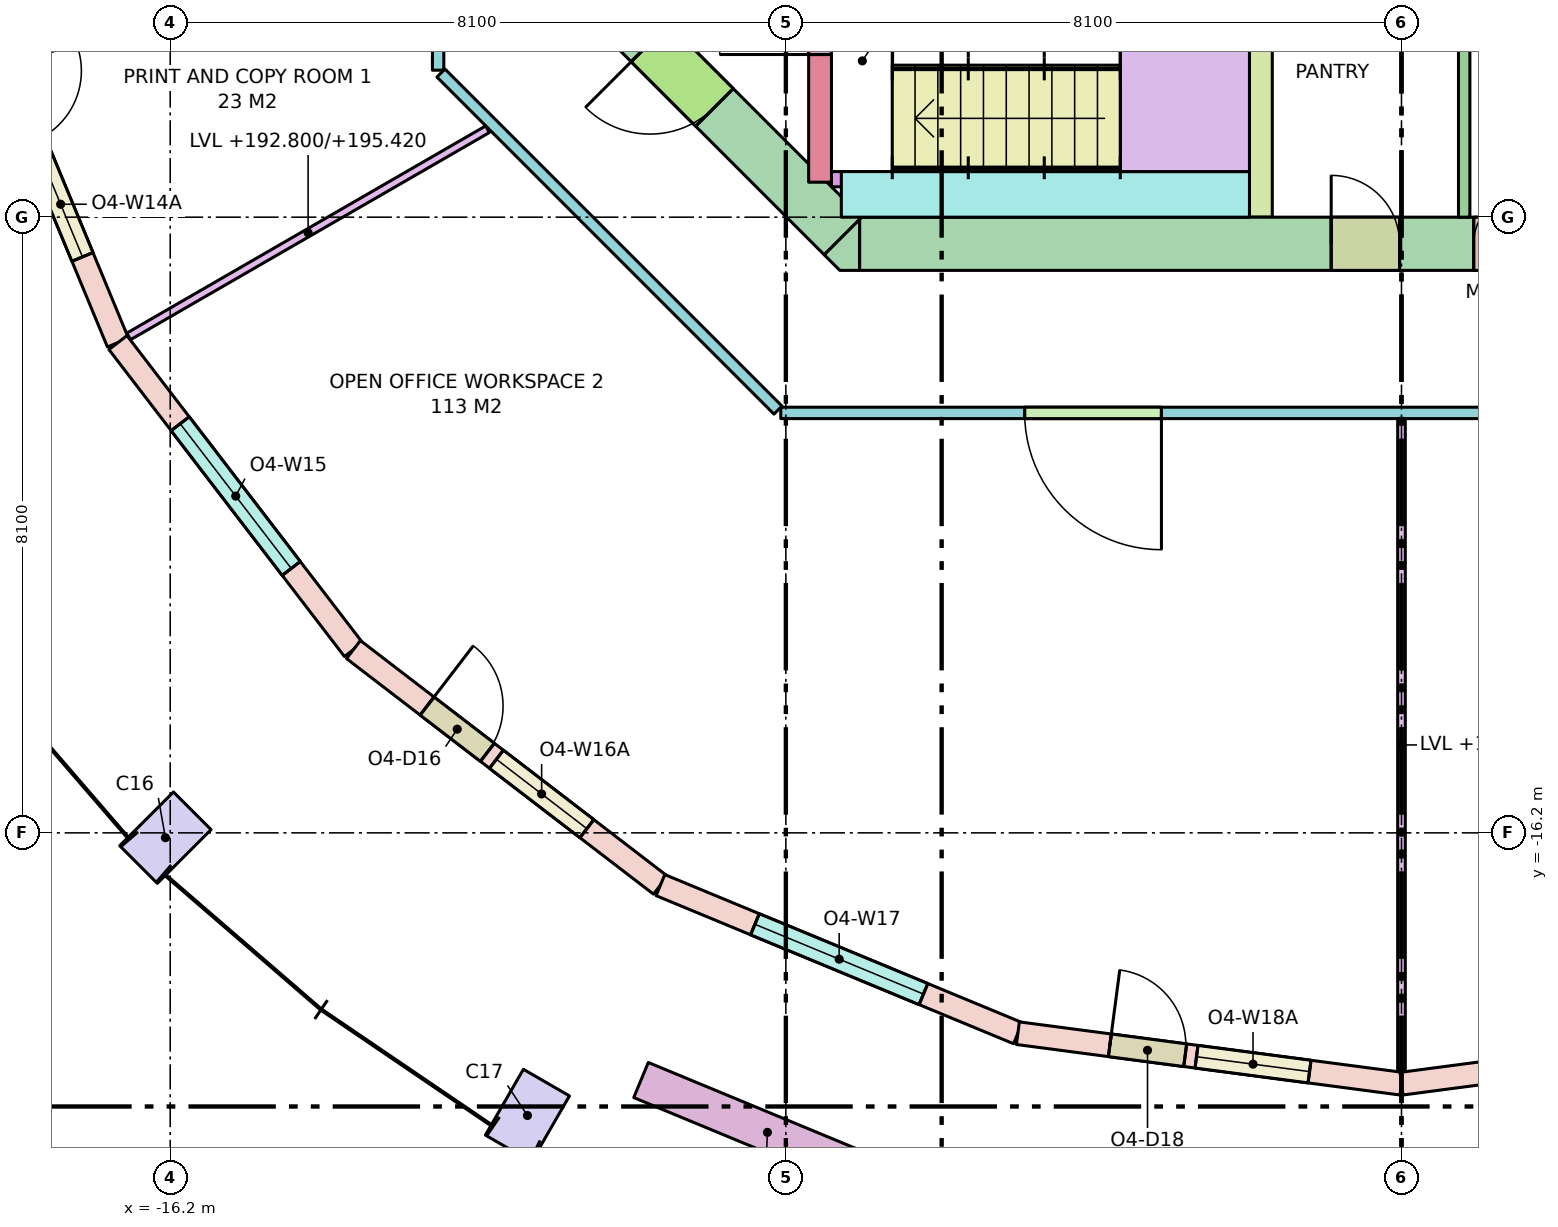
"""IFC4 building model, lengths in metres.
Left out: names, types, materials, properties, quantities, classifications, styles, units other than length and angle.
Written with IfcOpenShell. Run it as: python <this file> out.ifc"""

import sys

from ifc_helpers import new_model, si_unit, direction, frame, frame_2d, origin, origin_2d, place, context, subcontext, project, spatial, polyline, rectangle, outline, extrude, element, fill, save


model = new_model("IFC4")
c1 = context("Model", 3, precision=1e-05, world=origin(), true_north=direction((0.0, 1.0)))
c2 = subcontext(c1, "Body", "Model", "MODEL_VIEW")
j1 = project(units=[si_unit("LENGTHUNIT", "METRE"), si_unit("PLANEANGLEUNIT", "RADIAN")], contexts=[c1])
p1 = place(None, origin())
s1 = spatial("IfcSite", under=j1, at=p1, CompositionType="ELEMENT")
p2 = place(p1, origin())
s2 = spatial("IfcBuilding", under=s1, at=p2, CompositionType="ELEMENT")
p3 = place(p2, frame((0.0, 0.0, 192.8)))
s3 = spatial("IfcBuildingStorey", under=s2, at=p3, CompositionType="ELEMENT", Elevation=192.8)
for number, where, z_axis, x_axis in (
    (1, (-16.263, -16.263, 0.0), (0.0, 0.0, 1.0), (0.707, -0.707, 0.0)),
    (2, (-11.5, -19.919, 0.0), (0.0, 0.0, 1.0), (0.866, -0.5, 0.0)),
):
    element("IfcColumn", number, at=place(p3, frame(where, z_axis=z_axis, x_axis=x_axis)), inside=s3, PredefinedType="COLUMN", context=c2, shape_type="SweptSolid", body=[
        extrude(rectangle(XDim=0.7, YDim=1.0, at=origin_2d()), origin(), (0.0, 0.0, 1.0), 3.7),
    ])
p4 = place(p3, frame((-7.13, -8.45, -0.28), z_axis=(0.0, 0.0, 1.0), x_axis=(1.0, 0.0, 0.0)))
e3 = element("IfcWall", 3, at=p4, inside=s3, PredefinedType="SHEAR", context=c2, shape_type="SweptSolid", body=[
    extrude(rectangle(XDim=14.26, YDim=0.7, at=frame_2d((7.13, 0.0))), origin(), (0.0, 0.0, 1.0), 3.7),
])
p5 = place(p4, frame((8.08, 0.0, 0.28)))
e4 = element("IfcOpeningElement", 4, at=p5, cuts=e3, PredefinedType="OPENING", context=c2, shape_type="SweptSolid", body=[
    extrude(rectangle(XDim=0.7, YDim=2.1, at=frame_2d((0.35, 1.05))), frame((0.0, 0.36, 0.0), z_axis=(0.0, -1.0, 0.0), x_axis=(1.0, 0.0, 0.0)), (0.0, 0.0, 1.0), 0.72),
])
p6 = place(p4, frame((6.205, 0.0, 0.28)))
e5 = element("IfcOpeningElement", 5, at=p6, cuts=e3, PredefinedType="OPENING", context=c2, shape_type="SweptSolid", body=[
    extrude(rectangle(XDim=0.9, YDim=2.1, at=frame_2d((0.45, 1.05))), frame((0.0, 0.36, 0.0), z_axis=(0.0, -1.0, 0.0), x_axis=(1.0, 0.0, 0.0)), (0.0, 0.0, 1.0), 0.72),
])
p7 = place(p4, frame((9.445, 0.0, 0.28)))
e6 = element("IfcOpeningElement", 6, at=p7, cuts=e3, PredefinedType="OPENING", context=c2, shape_type="SweptSolid", body=[
    extrude(rectangle(XDim=0.9, YDim=2.1, at=frame_2d((0.45, 1.05))), frame((0.0, 0.36, 0.0), z_axis=(0.0, -1.0, 0.0), x_axis=(1.0, 0.0, 0.0)), (0.0, 0.0, 1.0), 0.72),
])
p8 = place(p4, frame((11.431, 0.0, 0.28)))
e7 = element("IfcOpeningElement", 7, at=p8, cuts=e3, PredefinedType="OPENING", context=c2, shape_type="SweptSolid", body=[
    extrude(rectangle(XDim=0.9, YDim=2.1, at=frame_2d((0.45, 1.05))), frame((0.0, 0.36, 0.0), z_axis=(0.0, -1.0, 0.0), x_axis=(1.0, 0.0, 0.0)), (0.0, 0.0, 1.0), 0.72),
])
p9 = place(p3, frame((-7.347, -8.347, -0.28), z_axis=(0.0, 0.0, 1.0), x_axis=(-0.707106781187, 0.707106781187, 0.0)))
e8 = element("IfcWall", 8, at=p9, inside=s3, PredefinedType="SHEAR", context=c2, shape_type="SweptSolid", body=[
    extrude(rectangle(XDim=4.243, YDim=0.7, at=frame_2d((2.121, 0.0))), origin(), (0.0, 0.0, 1.0), 3.7),
])
p10 = place(p9, frame((2.393, 0.0, 0.28)))
e9 = element("IfcOpeningElement", 9, at=p10, cuts=e8, PredefinedType="OPENING", context=c2, shape_type="SweptSolid", body=[
    extrude(rectangle(XDim=1.2, YDim=2.1, at=frame_2d((0.6, 1.05))), frame((0.0, 0.36, 0.0), z_axis=(0.0, -1.0, 0.0), x_axis=(1.0, 0.0, 0.0)), (0.0, 0.0, 1.0), 0.72),
])
p11 = place(p3, frame((0.0, 0.0, -0.28)))
e10 = element("IfcWall", 10, at=p11, inside=s3, PredefinedType="SHEAR", context=c2, shape_type="SweptSolid", body=[
    extrude(outline(polyline([(-7.39, -8.8), (-7.595, -8.595), (-7.595, -8.595), (-7.595, -8.595), (-7.13, -8.13), (-7.13, -8.8), (-7.13, -8.8), (-7.39, -8.8)])), origin(), (0.0, 0.0, 1.0), 3.7),
])
p12 = place(p3, frame((-1.85, -8.1, 0.0), z_axis=(0.0, 0.0, 1.0), x_axis=(0.0, 1.0, 0.0)))
e11 = element("IfcWall", 11, at=p12, inside=s3, PredefinedType="SHEAR", context=c2, shape_type="SweptSolid", body=[
    extrude(rectangle(XDim=6.6, YDim=0.3, at=frame_2d((3.3, 0.0))), origin(), (0.0, 0.0, 1.0), 3.42),
])
p13 = place(p3, frame((-7.65, -7.64, 0.0), z_axis=(0.0, 0.0, 1.0), x_axis=(0.0, 1.0, 0.0)))
e12 = element("IfcWall", 12, at=p13, inside=s3, PredefinedType="SHEAR", context=c2, shape_type="SweptSolid", body=[
    extrude(rectangle(XDim=3.14, YDim=0.3, at=frame_2d((1.57, 0.0))), origin(), (0.0, 0.0, 1.0), 3.42),
])
p14 = place(p13, frame((1.68, 0.0, 0.0)))
e13 = element("IfcOpeningElement", 13, at=p14, cuts=e12, PredefinedType="OPENING", context=c2, shape_type="SweptSolid", body=[
    extrude(rectangle(XDim=1.32, YDim=2.1, at=frame_2d((0.66, 1.05))), frame((0.0, 0.16, 0.0), z_axis=(0.0, -1.0, 0.0), x_axis=(1.0, 0.0, 0.0)), (0.0, 0.0, 1.0), 0.32),
])
p15 = place(p3, frame((-7.5, -7.6, 0.0), z_axis=(0.0, 0.0, 1.0), x_axis=(1.0, 0.0, 0.0)))
e14 = element("IfcWall", 14, at=p15, inside=s3, PredefinedType="SHEAR", context=c2, shape_type="SweptSolid", body=[
    extrude(rectangle(XDim=0.6, YDim=0.2, at=frame_2d((0.3, 0.0))), origin(), (0.0, 0.0, 1.0), 3.42),
])
p16 = place(p3, frame((-7.37, -7.8, 0.0), z_axis=(0.0, 0.0, 1.0), x_axis=(1.0, 0.0, 0.0)))
e15 = element("IfcWall", 15, at=p16, inside=s3, PredefinedType="SHEAR", context=c2, shape_type="SweptSolid", body=[
    extrude(rectangle(XDim=5.37, YDim=0.6, at=frame_2d((2.685, 0.0))), origin(), (0.0, 0.0, 1.0), 3.42),
])
p17 = place(p3, frame((-18.836, -5.047, 0.0), z_axis=(0.0, 0.0, 1.0), x_axis=(0.382724538613, -0.923862504675, 0.0)))
e16 = element("IfcWall", 16, at=p17, inside=s3, PredefinedType="STANDARD", context=c2, shape_type="SweptSolid", body=[
    extrude(rectangle(XDim=5.091, YDim=0.3, at=frame_2d((2.545, 0.0))), origin(), (0.0, 0.0, 1.0), 3.42),
])
p18 = place(p17, frame((1.22, 0.0, 0.0)))
e17 = element("IfcOpeningElement", 17, at=p18, cuts=e16, PredefinedType="OPENING", context=c2, shape_type="SweptSolid", body=[
    extrude(rectangle(XDim=1.0, YDim=2.4, at=frame_2d((0.5, 1.2))), frame((0.0, 0.16, 0.0), z_axis=(0.0, -1.0, 0.0), x_axis=(1.0, 0.0, 0.0)), (0.0, 0.0, 1.0), 0.32),
])
p19 = place(p17, frame((2.37, 0.0, 0.8)))
e18 = element("IfcOpeningElement", 18, at=p19, cuts=e16, PredefinedType="OPENING", context=c2, shape_type="SweptSolid", body=[
    extrude(rectangle(XDim=1.5, YDim=2.4, at=frame_2d((0.75, 1.2))), frame((0.0, 0.16, 0.0), z_axis=(0.0, -1.0, 0.0), x_axis=(1.0, 0.0, 0.0)), (0.0, 0.0, 1.0), 0.32),
])
p20 = place(p3, frame((-16.887, -9.75, 0.0), z_axis=(0.0, 0.0, 1.0), x_axis=(0.608757714995, -0.79335619014, 0.0)))
e19 = element("IfcWall", 19, at=p20, inside=s3, PredefinedType="STANDARD", context=c2, shape_type="SweptSolid", body=[
    extrude(rectangle(XDim=5.091, YDim=0.3, at=frame_2d((2.545, 0.0))), origin(), (0.0, 0.0, 1.0), 3.42),
])
p21 = place(p20, frame((1.345, 0.0, 0.8)))
e20 = element("IfcOpeningElement", 20, at=p21, cuts=e19, PredefinedType="OPENING", context=c2, shape_type="SweptSolid", body=[
    extrude(rectangle(XDim=2.4, YDim=2.4, at=frame_2d((1.2, 1.2))), frame((0.0, 0.16, 0.0), z_axis=(0.0, -1.0, 0.0), x_axis=(1.0, 0.0, 0.0)), (0.0, 0.0, 1.0), 0.32),
])
p22 = place(p3, frame((-13.789, -13.789, 0.0), z_axis=(0.0, 0.0, 1.0), x_axis=(0.79335619014, -0.608757714995, 0.0)))
e21 = element("IfcWall", 21, at=p22, inside=s3, PredefinedType="STANDARD", context=c2, shape_type="SweptSolid", body=[
    extrude(rectangle(XDim=5.091, YDim=0.3, at=frame_2d((2.545, 0.0))), origin(), (0.0, 0.0, 1.0), 3.42),
])
p23 = place(p22, frame((1.22, 0.0, 0.0)))
e22 = element("IfcOpeningElement", 22, at=p23, cuts=e21, PredefinedType="OPENING", context=c2, shape_type="SweptSolid", body=[
    extrude(rectangle(XDim=1.0, YDim=2.4, at=frame_2d((0.5, 1.2))), frame((0.0, 0.16, 0.0), z_axis=(0.0, -1.0, 0.0), x_axis=(1.0, 0.0, 0.0)), (0.0, 0.0, 1.0), 0.32),
])
p24 = place(p22, frame((2.37, 0.0, 0.8)))
e23 = element("IfcOpeningElement", 23, at=p24, cuts=e21, PredefinedType="OPENING", context=c2, shape_type="SweptSolid", body=[
    extrude(rectangle(XDim=1.5, YDim=2.4, at=frame_2d((0.75, 1.2))), frame((0.0, 0.16, 0.0), z_axis=(0.0, -1.0, 0.0), x_axis=(1.0, 0.0, 0.0)), (0.0, 0.0, 1.0), 0.32),
])
p25 = place(p3, frame((-9.75, -16.887, 0.0), z_axis=(0.0, 0.0, 1.0), x_axis=(0.923862504675, -0.382724538613, 0.0)))
e24 = element("IfcWall", 24, at=p25, inside=s3, PredefinedType="STANDARD", context=c2, shape_type="SweptSolid", body=[
    extrude(rectangle(XDim=5.091, YDim=0.3, at=frame_2d((2.545, 0.0))), origin(), (0.0, 0.0, 1.0), 3.42),
])
p26 = place(p25, frame((1.345, 0.0, 0.8)))
e25 = element("IfcOpeningElement", 25, at=p26, cuts=e24, PredefinedType="OPENING", context=c2, shape_type="SweptSolid", body=[
    extrude(rectangle(XDim=2.4, YDim=2.4, at=frame_2d((1.2, 1.2))), frame((0.0, 0.16, 0.0), z_axis=(0.0, -1.0, 0.0), x_axis=(1.0, 0.0, 0.0)), (0.0, 0.0, 1.0), 0.32),
])
p27 = place(p3, frame((-5.047, -18.836, 0.0), z_axis=(0.0, 0.0, 1.0), x_axis=(0.99144890792, -0.130495451964, 0.0)))
e26 = element("IfcWall", 26, at=p27, inside=s3, PredefinedType="STANDARD", context=c2, shape_type="SweptSolid", body=[
    extrude(rectangle(XDim=5.091, YDim=0.3, at=frame_2d((2.545, 0.0))), origin(), (0.0, 0.0, 1.0), 3.42),
])
p28 = place(p27, frame((1.22, 0.0, 0.0)))
e27 = element("IfcOpeningElement", 27, at=p28, cuts=e26, PredefinedType="OPENING", context=c2, shape_type="SweptSolid", body=[
    extrude(rectangle(XDim=1.0, YDim=2.4, at=frame_2d((0.5, 1.2))), frame((0.0, 0.16, 0.0), z_axis=(0.0, -1.0, 0.0), x_axis=(1.0, 0.0, 0.0)), (0.0, 0.0, 1.0), 0.32),
])
p29 = place(p27, frame((2.37, 0.0, 0.8)))
e28 = element("IfcOpeningElement", 28, at=p29, cuts=e26, PredefinedType="OPENING", context=c2, shape_type="SweptSolid", body=[
    extrude(rectangle(XDim=1.5, YDim=2.4, at=frame_2d((0.75, 1.2))), frame((0.0, 0.16, 0.0), z_axis=(0.0, -1.0, 0.0), x_axis=(1.0, 0.0, 0.0)), (0.0, 0.0, 1.0), 0.32),
])
p30 = place(p3, frame((0.0, -19.5, 0.0), z_axis=(0.0, 0.0, 1.0), x_axis=(0.99144890792, 0.130495451964, 0.0)))
e29 = element("IfcWall", 29, at=p30, inside=s3, PredefinedType="STANDARD", context=c2, shape_type="SweptSolid", body=[
    extrude(rectangle(XDim=5.091, YDim=0.3, at=frame_2d((2.545, 0.0))), origin(), (0.0, 0.0, 1.0), 3.42),
])
p31 = place(p30, frame((1.345, 0.0, 0.8)))
e30 = element("IfcOpeningElement", 30, at=p31, cuts=e29, PredefinedType="OPENING", context=c2, shape_type="SweptSolid", body=[
    extrude(rectangle(XDim=2.4, YDim=2.4, at=frame_2d((1.2, 1.2))), frame((0.0, 0.16, 0.0), z_axis=(0.0, -1.0, 0.0), x_axis=(1.0, 0.0, 0.0)), (0.0, 0.0, 1.0), 0.32),
])
p32 = place(p3, frame((-10.006, -19.452, 0.0), z_axis=(0.0, 0.0, 1.0), x_axis=(0.923885420167, -0.382669217998, 0.0)))
e31 = element("IfcWall", 31, at=p32, inside=s3, PredefinedType="PARAPET", context=c2, shape_type="SweptSolid", body=[
    extrude(rectangle(XDim=3.6, YDim=0.5, at=frame_2d((1.8, 0.0))), origin(), (0.0, 0.0, 1.0), 0.9),
])
p33 = place(p3, frame((0.825, -8.1, 0.0), z_axis=(0.0, 0.0, 1.0), x_axis=(0.0, 1.0, 0.0)))
e32 = element("IfcWall", 32, at=p33, inside=s3, PredefinedType="PARTITIONING", context=c2, shape_type="SweptSolid", body=[
    extrude(rectangle(XDim=3.0, YDim=0.15, at=frame_2d((1.5, 0.0))), origin(), (0.0, 0.0, 1.0), 3.42),
])
p34 = place(p3, frame((8.167, -10.675, 0.0), z_axis=(0.0, 0.0, 1.0), x_axis=(-1.0, 0.0, 0.0)))
e33 = element("IfcWall", 33, at=p34, inside=s3, PredefinedType="PARTITIONING", context=c2, shape_type="SweptSolid", body=[
    extrude(rectangle(XDim=16.333, YDim=0.15, at=frame_2d((8.167, 0.0))), origin(), (0.0, 0.0, 1.0), 2.62),
])
p35 = place(p34, frame((11.325, 0.0, 0.0)))
e34 = element("IfcOpeningElement", 34, at=p35, cuts=e33, PredefinedType="OPENING", context=c2, shape_type="SweptSolid", body=[
    extrude(rectangle(XDim=1.8, YDim=2.1, at=frame_2d((0.9, 1.05))), frame((0.0, 0.085, 0.0), z_axis=(0.0, -1.0, 0.0), x_axis=(1.0, 0.0, 0.0)), (0.0, 0.0, 1.0), 0.17),
])
p36 = place(p34, frame((4.581, 0.0, 0.0)))
e35 = element("IfcOpeningElement", 35, at=p36, cuts=e33, PredefinedType="OPENING", context=c2, shape_type="SweptSolid", body=[
    extrude(rectangle(XDim=1.0, YDim=2.1, at=frame_2d((0.5, 1.05))), frame((0.0, 0.085, 0.0), z_axis=(0.0, -1.0, 0.0), x_axis=(1.0, 0.0, 0.0)), (0.0, 0.0, 1.0), 0.17),
])
p37 = place(p3, frame((-8.204, -10.638, 0.0), z_axis=(0.0, 0.0, 1.0), x_axis=(-0.707106781187, 0.707106781187, 0.0)))
e36 = element("IfcWall", 36, at=p37, inside=s3, PredefinedType="PARTITIONING", context=c2, shape_type="SweptSolid", body=[
    extrude(rectangle(XDim=6.271, YDim=0.15, at=frame_2d((3.135, 0.0))), origin(), (0.0, 0.0, 1.0), 2.62),
])
p38 = place(p3, frame((-12.675, -6.167, 0.0), z_axis=(0.0, 0.0, 1.0), x_axis=(0.0, 1.0, 0.0)))
e37 = element("IfcWall", 37, at=p38, inside=s3, PredefinedType="PARTITIONING", context=c2, shape_type="SweptSolid", body=[
    extrude(rectangle(XDim=12.333, YDim=0.15, at=frame_2d((6.167, 0.0))), origin(), (0.0, 0.0, 1.0), 2.62),
])
p39 = place(p38, frame((10.473, 0.0, 0.0)))
e38 = element("IfcOpeningElement", 38, at=p39, cuts=e37, PredefinedType="OPENING", context=c2, shape_type="SweptSolid", body=[
    extrude(rectangle(XDim=0.9, YDim=2.1, at=frame_2d((0.45, 1.05))), frame((0.0, 0.085, 0.0), z_axis=(0.0, -1.0, 0.0), x_axis=(1.0, 0.0, 0.0)), (0.0, 0.0, 1.0), 0.17),
])
p40 = place(p38, frame((7.416, 0.0, 0.0)))
e39 = element("IfcOpeningElement", 39, at=p40, cuts=e37, PredefinedType="OPENING", context=c2, shape_type="SweptSolid", body=[
    extrude(rectangle(XDim=0.9, YDim=2.1, at=frame_2d((0.45, 1.05))), frame((0.0, 0.085, 0.0), z_axis=(0.0, -1.0, 0.0), x_axis=(1.0, 0.0, 0.0)), (0.0, 0.0, 1.0), 0.17),
])
p41 = place(p38, frame((4.018, 0.0, 0.0)))
e40 = element("IfcOpeningElement", 40, at=p41, cuts=e37, PredefinedType="OPENING", context=c2, shape_type="SweptSolid", body=[
    extrude(rectangle(XDim=0.9, YDim=2.1, at=frame_2d((0.45, 1.05))), frame((0.0, 0.085, 0.0), z_axis=(0.0, -1.0, 0.0), x_axis=(1.0, 0.0, 0.0)), (0.0, 0.0, 1.0), 0.17),
])
p42 = place(p38, frame((0.96, 0.0, 0.0)))
e41 = element("IfcOpeningElement", 41, at=p42, cuts=e37, PredefinedType="OPENING", context=c2, shape_type="SweptSolid", body=[
    extrude(rectangle(XDim=0.9, YDim=2.1, at=frame_2d((0.45, 1.05))), frame((0.0, 0.085, 0.0), z_axis=(0.0, -1.0, 0.0), x_axis=(1.0, 0.0, 0.0)), (0.0, 0.0, 1.0), 0.17),
])
p43 = place(p3, frame((-12.025, -6.943, 0.0), z_axis=(0.0, 0.0, 1.0), x_axis=(-0.866029712004, -0.499992537871, 0.0)))
e42 = element("IfcWall", 42, at=p43, inside=s3, PredefinedType="PARTITIONING", context=c2, shape_type="SweptSolid", body=[
    extrude(rectangle(XDim=5.451, YDim=0.1, at=frame_2d((2.726, 0.0))), origin(), (0.0, 0.0, 1.0), 2.62),
])
p44 = place(p3, frame((0.0, -10.75, 0.0), z_axis=(0.0, 0.0, 1.0), x_axis=(0.0, -1.0, 0.0)))
e43 = element("IfcWall", 43, at=p44, inside=s3, PredefinedType="PARTITIONING", context=c2, shape_type="SweptSolid", body=[
    extrude(rectangle(XDim=8.587, YDim=0.1, at=frame_2d((4.293, 0.0))), origin(), (0.0, 0.0, 1.0), 2.62),
])
p45 = place(p19, origin())
e44 = element("IfcWindow", 44, at=p45, inside=s3, PartitioningType="SINGLE_PANEL", PredefinedType="WINDOW", context=c2, shape_type="SweptSolid", body=[
    extrude(rectangle(XDim=1.5, YDim=2.4, at=frame_2d((0.75, 1.2))), frame((0.0, 0.03, 0.0), z_axis=(0.0, -1.0, 0.0), x_axis=(1.0, 0.0, 0.0)), (0.0, 0.0, 1.0), 0.06),
])
fill(e18, e44)
p46 = place(p21, origin())
e45 = element("IfcWindow", 45, at=p46, inside=s3, PartitioningType="SINGLE_PANEL", PredefinedType="WINDOW", context=c2, shape_type="SweptSolid", body=[
    extrude(rectangle(XDim=2.4, YDim=2.4, at=frame_2d((1.2, 1.2))), frame((0.0, 0.03, 0.0), z_axis=(0.0, -1.0, 0.0), x_axis=(1.0, 0.0, 0.0)), (0.0, 0.0, 1.0), 0.06),
])
fill(e20, e45)
p47 = place(p23, origin())
e46 = element("IfcDoor", 46, at=p47, inside=s3, OperationType="SINGLE_SWING_LEFT", PredefinedType="DOOR", context=c2, shape_type="SweptSolid", body=[
    extrude(rectangle(XDim=1.0, YDim=2.4, at=frame_2d((0.5, 1.2))), frame((0.0, 0.025, 0.0), z_axis=(0.0, -1.0, 0.0), x_axis=(1.0, 0.0, 0.0)), (0.0, 0.0, 1.0), 0.05),
])
fill(e22, e46)
p48 = place(p24, origin())
e47 = element("IfcWindow", 47, at=p48, inside=s3, PartitioningType="SINGLE_PANEL", PredefinedType="WINDOW", context=c2, shape_type="SweptSolid", body=[
    extrude(rectangle(XDim=1.5, YDim=2.4, at=frame_2d((0.75, 1.2))), frame((0.0, 0.03, 0.0), z_axis=(0.0, -1.0, 0.0), x_axis=(1.0, 0.0, 0.0)), (0.0, 0.0, 1.0), 0.06),
])
fill(e23, e47)
p49 = place(p26, origin())
e48 = element("IfcWindow", 48, at=p49, inside=s3, PartitioningType="SINGLE_PANEL", PredefinedType="WINDOW", context=c2, shape_type="SweptSolid", body=[
    extrude(rectangle(XDim=2.4, YDim=2.4, at=frame_2d((1.2, 1.2))), frame((0.0, 0.03, 0.0), z_axis=(0.0, -1.0, 0.0), x_axis=(1.0, 0.0, 0.0)), (0.0, 0.0, 1.0), 0.06),
])
fill(e25, e48)
p50 = place(p28, origin())
e49 = element("IfcDoor", 49, at=p50, inside=s3, OperationType="SINGLE_SWING_LEFT", PredefinedType="DOOR", context=c2, shape_type="SweptSolid", body=[
    extrude(rectangle(XDim=1.0, YDim=2.4, at=frame_2d((0.5, 1.2))), frame((0.0, 0.025, 0.0), z_axis=(0.0, -1.0, 0.0), x_axis=(1.0, 0.0, 0.0)), (0.0, 0.0, 1.0), 0.05),
])
fill(e27, e49)
p51 = place(p29, origin())
e50 = element("IfcWindow", 50, at=p51, inside=s3, PartitioningType="SINGLE_PANEL", PredefinedType="WINDOW", context=c2, shape_type="SweptSolid", body=[
    extrude(rectangle(XDim=1.5, YDim=2.4, at=frame_2d((0.75, 1.2))), frame((0.0, 0.03, 0.0), z_axis=(0.0, -1.0, 0.0), x_axis=(1.0, 0.0, 0.0)), (0.0, 0.0, 1.0), 0.06),
])
fill(e28, e50)
p52 = place(p14, origin())
e51 = element("IfcDoor", 51, at=p52, inside=s3, OperationType="DOUBLE_DOOR_SINGLE_SWING", PredefinedType="DOOR", context=c2, shape_type="SweptSolid", body=[
    extrude(rectangle(XDim=1.32, YDim=2.1, at=frame_2d((0.66, 1.05))), frame((0.0, 0.025, 0.0), z_axis=(0.0, -1.0, 0.0), x_axis=(1.0, 0.0, 0.0)), (0.0, 0.0, 1.0), 0.05),
])
fill(e13, e51)
p53 = place(p10, origin())
e52 = element("IfcDoor", 52, at=p53, inside=s3, OperationType="SINGLE_SWING_RIGHT", PredefinedType="DOOR", context=c2, shape_type="SweptSolid", body=[
    extrude(rectangle(XDim=1.2, YDim=2.1, at=frame_2d((0.6, 1.05))), frame((0.0, 0.025, 0.0), z_axis=(0.0, -1.0, 0.0), x_axis=(1.0, 0.0, 0.0)), (0.0, 0.0, 1.0), 0.05),
])
fill(e9, e52)
p54 = place(p5, origin())
e53 = element("IfcDoor", 53, at=p54, inside=s3, OperationType="SINGLE_SWING_RIGHT", PredefinedType="DOOR", context=c2, shape_type="SweptSolid", body=[
    extrude(rectangle(XDim=0.7, YDim=2.1, at=frame_2d((0.35, 1.05))), frame((0.0, 0.025, 0.0), z_axis=(0.0, -1.0, 0.0), x_axis=(1.0, 0.0, 0.0)), (0.0, 0.0, 1.0), 0.05),
])
fill(e4, e53)
p55 = place(p6, origin())
e54 = element("IfcDoor", 54, at=p55, inside=s3, OperationType="SINGLE_SWING_LEFT", PredefinedType="DOOR", context=c2, shape_type="SweptSolid", body=[
    extrude(rectangle(XDim=0.9, YDim=2.1, at=frame_2d((0.45, 1.05))), frame((0.0, 0.025, 0.0), z_axis=(0.0, -1.0, 0.0), x_axis=(1.0, 0.0, 0.0)), (0.0, 0.0, 1.0), 0.05),
])
fill(e5, e54)
p56 = place(p35, origin())
e55 = element("IfcDoor", 55, at=p56, inside=s3, OperationType="DOUBLE_DOOR_SINGLE_SWING", PredefinedType="DOOR", context=c2, shape_type="SweptSolid", body=[
    extrude(rectangle(XDim=1.8, YDim=2.1, at=frame_2d((0.9, 1.05))), frame((0.0, 0.025, 0.0), z_axis=(0.0, -1.0, 0.0), x_axis=(1.0, 0.0, 0.0)), (0.0, 0.0, 1.0), 0.05),
])
fill(e34, e55)
save(model, sys.argv[1])
